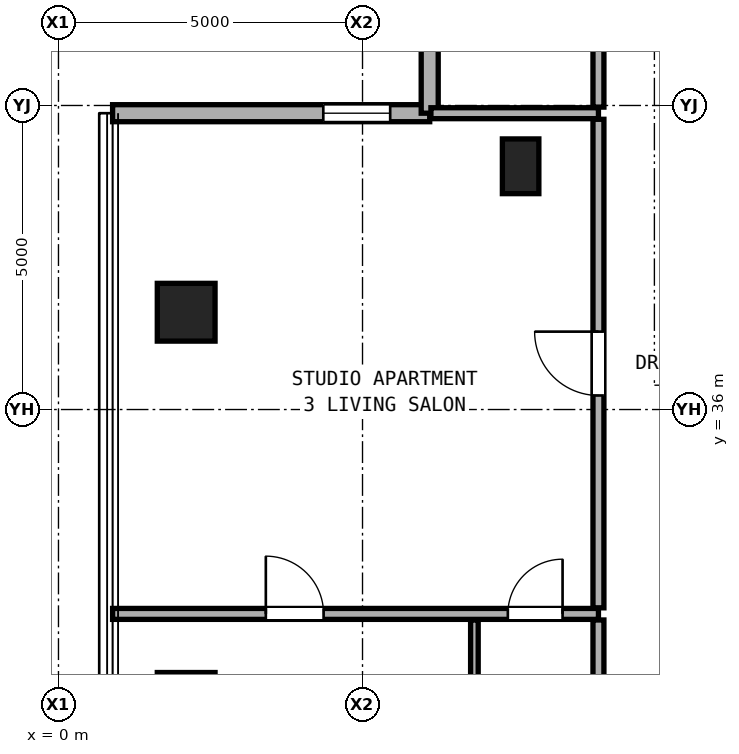
"""IFC4 building model, lengths in metres.
Left out: names, types, materials, properties, quantities, classifications, styles, units other than length and angle.
Written with IfcOpenShell. Run it as: python <this file> out.ifc"""

import sys

from ifc_helpers import new_model, si_unit, direction, frame, frame_2d, origin, origin_2d, place, context, subcontext, project, spatial, rectangle, hollow_rectangle, extrude, element, fill, save


model = new_model("IFC4")
c1 = context("Model", 3, precision=1e-05, world=origin(), true_north=direction((0.0, 1.0)))
c2 = subcontext(c1, "Body", "Model", "MODEL_VIEW")
j1 = project(units=[si_unit("LENGTHUNIT", "METRE"), si_unit("PLANEANGLEUNIT", "RADIAN")], contexts=[c1])
p1 = place(None, origin())
s1 = spatial("IfcSite", under=j1, at=p1, CompositionType="ELEMENT")
p2 = place(p1, origin())
s2 = spatial("IfcBuilding", under=s1, at=p2, CompositionType="ELEMENT")
p3 = place(p2, frame((0.0, 0.0, 186.9)))
s3 = spatial("IfcBuildingStorey", under=s2, at=p3, CompositionType="ELEMENT", Elevation=186.9)
for number, where, z_axis, x_axis in (
    (1, (2.1, 31.2, 0.0), (0.0, 0.0, 1.0), (1.0, 0.0, 0.0)),
    (2, (2.1, 37.6, 0.0), (0.0, 0.0, 1.0), (1.0, 0.0, 0.0)),
):
    element("IfcColumn", number, at=place(p3, frame(where, z_axis=z_axis, x_axis=x_axis)), inside=s3, PredefinedType="COLUMN", context=c2, shape_type="SweptSolid", body=[
        extrude(hollow_rectangle(XDim=0.95, YDim=0.95, WallThickness=0.05, at=origin_2d()), origin(), (0.0, 0.0, 1.0), 3.25),
    ])
p4 = place(p3, frame((7.6, 40.0, 0.0), z_axis=(0.0, 0.0, 1.0), x_axis=(1.0, 0.0, 0.0)))
e3 = element("IfcColumn", 3, at=p4, inside=s3, PredefinedType="PILASTER", context=c2, shape_type="SweptSolid", body=[
    extrude(rectangle(XDim=0.6, YDim=0.9, at=origin_2d()), origin(), (0.0, 0.0, 1.0), 3.25),
])
p5 = place(p3, frame((6.105, 40.873, 0.0), z_axis=(0.0, 0.0, 1.0), x_axis=(-1.0, 0.0, 0.0)))
e4 = element("IfcWall", 4, at=p5, inside=s3, PredefinedType="SOLIDWALL", context=c2, shape_type="SweptSolid", body=[
    extrude(rectangle(XDim=5.215, YDim=0.28, at=frame_2d((2.607, 0.0))), origin(), (0.0, 0.0, 1.0), 3.03),
])
p6 = place(p5, frame((0.65, 0.0, 0.85)))
e5 = element("IfcOpeningElement", 5, at=p6, cuts=e4, PredefinedType="OPENING", context=c2, shape_type="SweptSolid", body=[
    extrude(rectangle(XDim=1.1, YDim=2.0, at=frame_2d((0.55, 1.0))), frame((0.0, 0.15, 0.0), z_axis=(0.0, -1.0, 0.0), x_axis=(1.0, 0.0, 0.0)), (0.0, 0.0, 1.0), 0.3),
])
p7 = place(p3, frame((6.105, 46.088, 0.0), z_axis=(0.0, 0.0, 1.0), x_axis=(0.0, -1.0, 0.0)))
e6 = element("IfcWall", 6, at=p7, inside=s3, PredefinedType="SOLIDWALL", context=c2, shape_type="SweptSolid", body=[
    extrude(rectangle(XDim=5.215, YDim=0.28, at=frame_2d((2.607, 0.0))), origin(), (0.0, 0.0, 1.0), 3.03),
])
p8 = place(p3, frame((0.89, 32.639, 0.0), z_axis=(0.0, 0.0, 1.0), x_axis=(1.0, 0.0, 0.0)))
e7 = element("IfcWall", 7, at=p8, inside=s3, PredefinedType="PARTITIONING", context=c2, shape_type="SweptSolid", body=[
    extrude(rectangle(XDim=7.99, YDim=0.18, at=frame_2d((3.995, 0.0))), origin(), (0.0, 0.0, 1.0), 2.269),
])
p9 = place(p8, frame((2.52, 0.0, 0.0)))
e8 = element("IfcOpeningElement", 8, at=p9, cuts=e7, PredefinedType="OPENING", context=c2, shape_type="SweptSolid", body=[
    extrude(rectangle(XDim=0.95, YDim=2.15, at=frame_2d((0.475, 1.075))), frame((0.0, 0.1, 0.0), z_axis=(0.0, -1.0, 0.0), x_axis=(1.0, 0.0, 0.0)), (0.0, 0.0, 1.0), 0.2),
])
p10 = place(p8, frame((6.5, 0.0, 0.0)))
e9 = element("IfcOpeningElement", 9, at=p10, cuts=e7, PredefinedType="OPENING", context=c2, shape_type="SweptSolid", body=[
    extrude(rectangle(XDim=0.9, YDim=2.1, at=frame_2d((0.45, 1.05))), frame((0.0, 0.1, 0.0), z_axis=(0.0, -1.0, 0.0), x_axis=(1.0, 0.0, 0.0)), (0.0, 0.0, 1.0), 0.2),
])
p11 = place(p3, frame((6.125, 40.873, 0.0), z_axis=(0.0, 0.0, 1.0), x_axis=(1.0, 0.0, 0.0)))
e10 = element("IfcWall", 10, at=p11, inside=s3, PredefinedType="PARTITIONING", context=c2, shape_type="SweptSolid", body=[
    extrude(rectangle(XDim=2.755, YDim=0.18, at=frame_2d((1.377, 0.0))), origin(), (0.0, 0.0, 1.0), 3.05),
])
p12 = place(p3, frame((6.84, 29.991, 0.0), z_axis=(0.0, 0.0, 1.0), x_axis=(0.0, 1.0, 0.0)))
e11 = element("IfcWall", 11, at=p12, inside=s3, PredefinedType="PARTITIONING", context=c2, shape_type="SweptSolid", body=[
    extrude(rectangle(XDim=2.548, YDim=0.125, at=frame_2d((1.274, 0.0))), origin(), (0.0, 0.0, 1.0), 2.346),
])
p13 = place(p3, frame((8.88, 29.991, 0.0), z_axis=(0.0, 0.0, 1.0), x_axis=(0.0, 1.0, 0.0)))
e12 = element("IfcWall", 12, at=p13, inside=s3, PredefinedType="PARTITIONING", context=c2, shape_type="SweptSolid", body=[
    extrude(rectangle(XDim=2.548, YDim=0.18, at=frame_2d((1.274, 0.0))), origin(), (0.0, 0.0, 1.0), 2.346),
])
p14 = place(p3, frame((8.88, 32.739, 0.0), z_axis=(0.0, 0.0, 1.0), x_axis=(0.0, 1.0, 0.0)))
e13 = element("IfcWall", 13, at=p14, inside=s3, PredefinedType="PARTITIONING", context=c2, shape_type="SweptSolid", body=[
    extrude(rectangle(XDim=8.034, YDim=0.18, at=frame_2d((4.017, 0.0))), origin(), (0.0, 0.0, 1.0), 2.442),
])
p15 = place(p14, frame((3.492, 0.0, 0.0)))
e14 = element("IfcOpeningElement", 14, at=p15, cuts=e13, PredefinedType="OPENING", context=c2, shape_type="SweptSolid", body=[
    extrude(rectangle(XDim=1.05, YDim=2.2, at=frame_2d((0.525, 1.1))), frame((0.0, 0.1, 0.0), z_axis=(0.0, -1.0, 0.0), x_axis=(1.0, 0.0, 0.0)), (0.0, 0.0, 1.0), 0.2),
])
p16 = place(p3, frame((8.88, 40.973, 0.0), z_axis=(0.0, 0.0, 1.0), x_axis=(0.0, 1.0, 0.0)))
e15 = element("IfcWall", 15, at=p16, inside=s3, PredefinedType="PARTITIONING", context=c2, shape_type="SweptSolid", body=[
    extrude(rectangle(XDim=5.115, YDim=0.18, at=frame_2d((2.558, 0.0))), origin(), (0.0, 0.0, 1.0), 3.05),
])
p17 = place(p16, frame((2.083, 0.0, 0.0)))
e16 = element("IfcOpeningElement", 16, at=p17, cuts=e15, PredefinedType="OPENING", context=c2, shape_type="SweptSolid", body=[
    extrude(rectangle(XDim=0.95, YDim=2.15, at=frame_2d((0.475, 1.075))), frame((0.0, 0.1, 0.0), z_axis=(0.0, -1.0, 0.0), x_axis=(1.0, 0.0, 0.0)), (0.0, 0.0, 1.0), 0.2),
])
p18 = place(p6, origin())
e17 = element("IfcWindow", 17, at=p18, inside=s3, PartitioningType="SINGLE_PANEL", PredefinedType="WINDOW", context=c2, shape_type="SweptSolid", body=[
    extrude(rectangle(XDim=1.1, YDim=2.0, at=frame_2d((0.55, 1.0))), frame((0.0, 0.03, 0.0), z_axis=(0.0, -1.0, 0.0), x_axis=(1.0, 0.0, 0.0)), (0.0, 0.0, 1.0), 0.06),
])
fill(e5, e17)
p19 = place(p15, origin())
e18 = element("IfcDoor", 18, at=p19, inside=s3, OperationType="SINGLE_SWING_RIGHT", PredefinedType="DOOR", context=c2, shape_type="SweptSolid", body=[
    extrude(rectangle(XDim=1.05, YDim=2.2, at=frame_2d((0.525, 1.1))), frame((0.0, 0.025, 0.0), z_axis=(0.0, -1.0, 0.0), x_axis=(1.0, 0.0, 0.0)), (0.0, 0.0, 1.0), 0.05),
])
fill(e14, e18)
p20 = place(p9, origin())
e19 = element("IfcDoor", 19, at=p20, inside=s3, OperationType="SINGLE_SWING_LEFT", PredefinedType="DOOR", context=c2, shape_type="SweptSolid", body=[
    extrude(rectangle(XDim=0.95, YDim=2.15, at=frame_2d((0.475, 1.075))), frame((0.0, 0.025, 0.0), z_axis=(0.0, -1.0, 0.0), x_axis=(1.0, 0.0, 0.0)), (0.0, 0.0, 1.0), 0.05),
])
fill(e8, e19)
p21 = place(p10, origin())
e20 = element("IfcDoor", 20, at=p21, inside=s3, OperationType="SINGLE_SWING_RIGHT", PredefinedType="DOOR", context=c2, shape_type="SweptSolid", body=[
    extrude(rectangle(XDim=0.9, YDim=2.1, at=frame_2d((0.45, 1.05))), frame((0.0, 0.025, 0.0), z_axis=(0.0, -1.0, 0.0), x_axis=(1.0, 0.0, 0.0)), (0.0, 0.0, 1.0), 0.05),
])
fill(e9, e20)
save(model, sys.argv[1])
